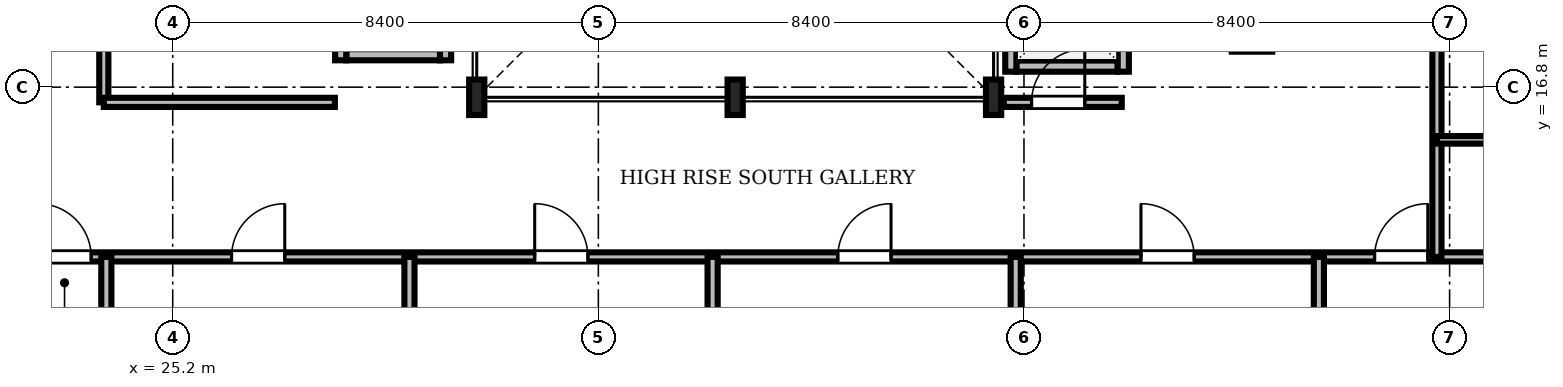
"""IFC4 building model, lengths in metres.
Left out: names, types, materials, properties, quantities, classifications, styles, units other than length and angle.
Written with IfcOpenShell. Run it as: python <this file> out.ifc"""

import sys

from ifc_helpers import new_model, si_unit, direction, frame, frame_2d, origin, origin_2d, place, context, subcontext, project, spatial, rectangle, i_section, extrude, source, transform, mapped, element, fill, save


model = new_model("IFC4")
c1 = context("Model", 3, precision=1e-05, world=origin(), true_north=direction((0.0, 1.0)))
c2 = subcontext(c1, "Body", "Model", "MODEL_VIEW")
j1 = project(units=[si_unit("LENGTHUNIT", "METRE"), si_unit("PLANEANGLEUNIT", "RADIAN")], contexts=[c1])
p1 = place(None, origin())
s1 = spatial("IfcSite", under=j1, at=p1, CompositionType="ELEMENT")
p2 = place(p1, origin())
s2 = spatial("IfcBuilding", under=s1, at=p2, CompositionType="ELEMENT")
p3 = place(p2, frame((0.0, 0.0, 207.3)))
s3 = spatial("IfcBuildingStorey", under=s2, at=p3, CompositionType="ELEMENT", Elevation=207.3)
m1 = source(origin(), c2, "Body", "SweptSolid", [
    extrude(i_section(OverallWidth=0.3, OverallDepth=0.7, WebThickness=0.017, FlangeThickness=0.032, FilletRadius=0.027, at=origin_2d()), origin(), (0.0, 0.0, 1.0), 3.53),
])
for number, where, z_axis, x_axis in (
    (1, (31.2, 16.6, 0.0), (0.0, 0.0, 1.0), (1.0, 0.0, 0.0)),
    (2, (36.3, 16.6, 0.0), (0.0, 0.0, 1.0), (1.0, 0.0, 0.0)),
    (3, (41.4, 16.6, 0.0), (0.0, 0.0, 1.0), (1.0, 0.0, 0.0)),
):
    element("IfcColumn", number, at=place(p3, frame(where, z_axis=z_axis, x_axis=x_axis)), inside=s3, PredefinedType="COLUMN", context=c2, shape_type="MappedRepresentation", body=[
        mapped(m1, transform((0.0, 0.0, 0.0), scale=1.0)),
    ])
m2 = source(origin(), c2, "Body", "SweptSolid", [
    extrude(rectangle(XDim=2.0, YDim=0.22, at=frame_2d((1.0, 0.0))), origin(), (0.0, 0.0, 1.0), 3.53),
])
p4 = place(p3, frame((41.85, 17.215, 0.0), z_axis=(0.0, 0.0, 1.0), x_axis=(1.0, 0.0, 0.0)))
e4 = element("IfcWall", 4, at=p4, inside=s3, PredefinedType="SOLIDWALL", context=c2, shape_type="MappedRepresentation", body=[
    mapped(m2, transform((0.0, 0.0, 0.0), scale=1.0)),
])
m3 = source(origin(), c2, "Body", "SweptSolid", [
    extrude(rectangle(XDim=2.19, YDim=0.22, at=frame_2d((1.095, 0.0))), origin(), (0.0, 0.0, 1.0), 3.53),
])
p5 = place(p3, frame((41.74, 17.105, 0.0), z_axis=(0.0, 0.0, 1.0), x_axis=(0.0, 1.0, 0.0)))
e5 = element("IfcWall", 5, at=p5, inside=s3, PredefinedType="SOLIDWALL", context=c2, shape_type="MappedRepresentation", body=[
    mapped(m3, transform((0.0, 0.0, 0.0), scale=1.0)),
])
p6 = place(p3, frame((43.96, 17.105, 0.0), z_axis=(0.0, 0.0, 1.0), x_axis=(0.0, 1.0, 0.0)))
e6 = element("IfcWall", 6, at=p6, inside=s3, PredefinedType="SOLIDWALL", context=c2, shape_type="MappedRepresentation", body=[
    mapped(m3, transform((0.0, 0.0, 0.0), scale=1.0)),
])
m4 = source(origin(), c2, "Body", "SweptSolid", [
    extrude(rectangle(XDim=1.1, YDim=2.2, at=frame_2d((0.55, 1.1))), frame((0.0, 0.12, 0.0), z_axis=(0.0, -1.0, 0.0), x_axis=(1.0, 0.0, 0.0)), (0.0, 0.0, 1.0), 0.24),
])
p7 = place(p6, frame((0.545, 0.0, 0.0)))
e7 = element("IfcOpeningElement", 7, at=p7, cuts=e6, PredefinedType="OPENING", context=c2, shape_type="MappedRepresentation", body=[
    mapped(m4, transform((0.0, 0.0, 0.0), scale=1.0)),
])
m5 = source(origin(), c2, "Body", "SweptSolid", [
    extrude(rectangle(XDim=1.85, YDim=0.22, at=frame_2d((0.925, 0.0))), origin(), (0.0, 0.0, 1.0), 2.972),
])
p8 = place(p3, frame((28.625, 17.44, 0.0), z_axis=(0.0, 0.0, 1.0), x_axis=(1.0, 0.0, 0.0)))
e8 = element("IfcWall", 8, at=p8, inside=s3, PredefinedType="SOLIDWALL", context=c2, shape_type="MappedRepresentation", body=[
    mapped(m5, transform((0.0, 0.0, 0.0), scale=1.0)),
])
m6 = source(origin(), c2, "Body", "SweptSolid", [
    extrude(rectangle(XDim=2.54, YDim=0.22, at=frame_2d((1.27, 0.0))), origin(), (0.0, 0.0, 1.0), 2.972),
])
p9 = place(p3, frame((28.515, 17.33, 0.0), z_axis=(0.0, 0.0, 1.0), x_axis=(0.0, 1.0, 0.0)))
e9 = element("IfcWall", 9, at=p9, inside=s3, PredefinedType="SOLIDWALL", context=c2, shape_type="MappedRepresentation", body=[
    mapped(m6, transform((0.0, 0.0, 0.0), scale=1.0)),
])
m7 = source(origin(), c2, "Body", "SweptSolid", [
    extrude(rectangle(XDim=2.54, YDim=0.22, at=frame_2d((1.27, 0.0))), origin(), (0.0, 0.0, 1.0), 3.53),
])
p10 = place(p3, frame((30.585, 17.33, 0.0), z_axis=(0.0, 0.0, 1.0), x_axis=(0.0, 1.0, 0.0)))
e10 = element("IfcWall", 10, at=p10, inside=s3, PredefinedType="SOLIDWALL", context=c2, shape_type="MappedRepresentation", body=[
    mapped(m7, transform((0.0, 0.0, 0.0), scale=1.0)),
])
m8 = source(origin(), c2, "Body", "SweptSolid", [
    extrude(rectangle(XDim=46.156, YDim=0.18, at=frame_2d((23.078, 0.0))), origin(), (0.0, 0.0, 1.0), 2.772),
])
p11 = place(p3, frame((11.422, 13.45, 0.0), z_axis=(0.0, 0.0, 1.0), x_axis=(1.0, 0.0, 0.0)))
e11 = element("IfcWall", 11, at=p11, inside=s3, PredefinedType="PARTITIONING", context=c2, shape_type="MappedRepresentation", body=[
    mapped(m8, transform((0.0, 0.0, 0.0), scale=1.0)),
])
m9 = source(origin(), c2, "Body", "SweptSolid", [
    extrude(rectangle(XDim=1.05, YDim=2.2, at=frame_2d((0.525, 1.1))), frame((0.0, 0.1, 0.0), z_axis=(0.0, -1.0, 0.0), x_axis=(1.0, 0.0, 0.0)), (0.0, 0.0, 1.0), 0.2),
])
p12 = place(p11, frame((11.118, 0.0, 0.0)))
e12 = element("IfcOpeningElement", 12, at=p12, cuts=e11, PredefinedType="OPENING", context=c2, shape_type="MappedRepresentation", body=[
    mapped(m9, transform((0.0, 0.0, 0.0), scale=1.0)),
])
p13 = place(p11, frame((14.939, 0.0, 0.0)))
e13 = element("IfcOpeningElement", 13, at=p13, cuts=e11, PredefinedType="OPENING", context=c2, shape_type="MappedRepresentation", body=[
    mapped(m9, transform((0.0, 0.0, 0.0), scale=1.0)),
])
p14 = place(p11, frame((20.922, 0.0, 0.0)))
e14 = element("IfcOpeningElement", 14, at=p14, cuts=e11, PredefinedType="OPENING", context=c2, shape_type="MappedRepresentation", body=[
    mapped(m9, transform((0.0, 0.0, 0.0), scale=1.0)),
])
p15 = place(p11, frame((26.904, 0.0, 0.0)))
e15 = element("IfcOpeningElement", 15, at=p15, cuts=e11, PredefinedType="OPENING", context=c2, shape_type="MappedRepresentation", body=[
    mapped(m9, transform((0.0, 0.0, 0.0), scale=1.0)),
])
p16 = place(p11, frame((32.887, 0.0, 0.0)))
e16 = element("IfcOpeningElement", 16, at=p16, cuts=e11, PredefinedType="OPENING", context=c2, shape_type="MappedRepresentation", body=[
    mapped(m9, transform((0.0, 0.0, 0.0), scale=1.0)),
])
p17 = place(p11, frame((37.498, 0.0, 0.0)))
e17 = element("IfcOpeningElement", 17, at=p17, cuts=e11, PredefinedType="OPENING", context=c2, shape_type="MappedRepresentation", body=[
    mapped(m9, transform((0.0, 0.0, 0.0), scale=1.0)),
])
m10 = source(origin(), c2, "Body", "SweptSolid", [
    extrude(rectangle(XDim=27.65, YDim=0.18, at=frame_2d((13.825, 0.0))), origin(), (0.0, 0.0, 1.0), 2.972),
])
p18 = place(p3, frame((50.15, 13.45, 0.0), z_axis=(0.0, 0.0, 1.0), x_axis=(0.0, 1.0, 0.0)))
e18 = element("IfcWall", 18, at=p18, inside=s3, PredefinedType="PARTITIONING", context=c2, shape_type="MappedRepresentation", body=[
    mapped(m10, transform((0.0, 0.0, 0.0), scale=1.0)),
])
p19 = place(p18, frame((5.237, 0.0, 0.0)))
e19 = element("IfcOpeningElement", 19, at=p19, cuts=e18, PredefinedType="OPENING", context=c2, shape_type="MappedRepresentation", body=[
    mapped(m9, transform((0.0, 0.0, 0.0), scale=1.0)),
])
p20 = place(p18, frame((14.38, 0.0, 0.0)))
e20 = element("IfcOpeningElement", 20, at=p20, cuts=e18, PredefinedType="OPENING", context=c2, shape_type="MappedRepresentation", body=[
    mapped(m9, transform((0.0, 0.0, 0.0), scale=1.0)),
])
p21 = place(p18, frame((23.523, 0.0, 0.0)))
e21 = element("IfcOpeningElement", 21, at=p21, cuts=e18, PredefinedType="OPENING", context=c2, shape_type="MappedRepresentation", body=[
    mapped(m9, transform((0.0, 0.0, 0.0), scale=1.0)),
])
m11 = source(origin(), c2, "Body", "SweptSolid", [
    extrude(rectangle(XDim=3.55, YDim=0.18, at=frame_2d((1.775, 0.0))), origin(), (0.0, 0.0, 1.0), 2.972),
])
p22 = place(p3, frame((23.84, 16.5, 0.0), z_axis=(0.0, 0.0, 1.0), x_axis=(0.0, 1.0, 0.0)))
e22 = element("IfcWall", 22, at=p22, inside=s3, PredefinedType="PARTITIONING", context=c2, shape_type="MappedRepresentation", body=[
    mapped(m11, transform((0.0, 0.0, 0.0), scale=1.0)),
])
p23 = place(p22, frame((1.15, 0.0, 0.0)))
e23 = element("IfcOpeningElement", 23, at=p23, cuts=e22, PredefinedType="OPENING", context=c2, shape_type="MappedRepresentation", body=[
    mapped(m9, transform((0.0, 0.0, 0.0), scale=1.0)),
])
m12 = source(origin(), c2, "Body", "SweptSolid", [
    extrude(rectangle(XDim=2.33, YDim=0.18, at=frame_2d((1.165, 0.0))), origin(), (0.0, 0.0, 1.0), 2.972),
])
p24 = place(p3, frame((41.6, 16.5, 0.0), z_axis=(0.0, 0.0, 1.0), x_axis=(1.0, 0.0, 0.0)))
e24 = element("IfcWall", 24, at=p24, inside=s3, PredefinedType="PARTITIONING", context=c2, shape_type="MappedRepresentation", body=[
    mapped(m12, transform((0.0, 0.0, 0.0), scale=1.0)),
])
p25 = place(p24, frame((0.55, 0.0, 0.0)))
e25 = element("IfcOpeningElement", 25, at=p25, cuts=e24, PredefinedType="OPENING", context=c2, shape_type="MappedRepresentation", body=[
    mapped(m9, transform((0.0, 0.0, 0.0), scale=1.0)),
])
m13 = source(origin(), c2, "Body", "SweptSolid", [
    extrude(rectangle(XDim=11.328, YDim=0.2, at=frame_2d((5.664, 0.0))), origin(), (0.0, 0.0, 1.0), 2.772),
])
for number, where, z_axis, x_axis in (
    (26, (23.89, 2.122, 0.0), (0.0, 0.0, 1.0), (0.0, 1.0, 0.0)),
    (27, (29.872, 2.122, 0.0), (0.0, 0.0, 1.0), (0.0, 1.0, 0.0)),
):
    element("IfcWall", number, at=place(p3, frame(where, z_axis=z_axis, x_axis=x_axis)), inside=s3, PredefinedType="PARTITIONING", context=c2, shape_type="MappedRepresentation", body=[
        mapped(m13, transform((0.0, 0.0, 0.0), scale=1.0)),
    ])
m14 = source(origin(), c2, "Body", "SweptSolid", [
    extrude(rectangle(XDim=11.52, YDim=0.2, at=frame_2d((5.76, 0.0))), origin(), (0.0, 0.0, 1.0), 2.772),
])
p26 = place(p3, frame((35.855, 1.93, 0.0), z_axis=(0.0, 0.0, 1.0), x_axis=(0.0, 1.0, 0.0)))
e28 = element("IfcWall", 28, at=p26, inside=s3, PredefinedType="PARTITIONING", context=c2, shape_type="MappedRepresentation", body=[
    mapped(m14, transform((0.0, 0.0, 0.0), scale=1.0)),
])
for number, where, z_axis, x_axis in (
    (29, (41.837, 2.122, 0.0), (0.0, 0.0, 1.0), (0.0, 1.0, 0.0)),
    (30, (47.82, 2.122, 0.0), (0.0, 0.0, 1.0), (0.0, 1.0, 0.0)),
):
    element("IfcWall", number, at=place(p3, frame(where, z_axis=z_axis, x_axis=x_axis)), inside=s3, PredefinedType="PARTITIONING", context=c2, shape_type="MappedRepresentation", body=[
        mapped(m13, transform((0.0, 0.0, 0.0), scale=1.0)),
    ])
m15 = source(origin(), c2, "Body", "SweptSolid", [
    extrude(rectangle(XDim=4.56, YDim=0.18, at=frame_2d((2.28, 0.0))), origin(), (0.0, 0.0, 1.0), 3.53),
])
p27 = place(p3, frame((23.84, 16.5, 0.0), z_axis=(0.0, 0.0, 1.0), x_axis=(1.0, 0.0, 0.0)))
e31 = element("IfcWall", 31, at=p27, inside=s3, PredefinedType="PARTITIONING", context=c2, shape_type="MappedRepresentation", body=[
    mapped(m15, transform((0.0, 0.0, 0.0), scale=1.0)),
])
m16 = source(origin(), c2, "Body", "SweptSolid", [
    extrude(rectangle(XDim=2.36, YDim=0.15, at=frame_2d((1.18, 0.0))), origin(), (0.0, 0.0, 1.0), 3.53),
])
p28 = place(p3, frame((50.15, 15.76, 0.0), z_axis=(0.0, 0.0, 1.0), x_axis=(1.0, 0.0, 0.0)))
e32 = element("IfcWall", 32, at=p28, inside=s3, PredefinedType="PARTITIONING", context=c2, shape_type="MappedRepresentation", body=[
    mapped(m16, transform((0.0, 0.0, 0.0), scale=1.0)),
])
m17 = source(origin(), c2, "Body", "SweptSolid", [
    extrude(rectangle(XDim=1.05, YDim=2.2, at=frame_2d((0.525, 1.1))), frame((0.0, 0.025, 0.0), z_axis=(0.0, -1.0, 0.0), x_axis=(1.0, 0.0, 0.0)), (0.0, 0.0, 1.0), 0.05),
])
p29 = place(p12, origin())
e33 = element("IfcDoor", 33, at=p29, inside=s3, OperationType="SINGLE_SWING_LEFT", PredefinedType="DOOR", context=c2, shape_type="MappedRepresentation", body=[
    mapped(m17, transform((0.0, 0.0, 0.0), scale=1.0)),
])
fill(e12, e33)
p30 = place(p13, origin())
e34 = element("IfcDoor", 34, at=p30, inside=s3, OperationType="SINGLE_SWING_RIGHT", PredefinedType="DOOR", context=c2, shape_type="MappedRepresentation", body=[
    mapped(m17, transform((0.0, 0.0, 0.0), scale=1.0)),
])
fill(e13, e34)
p31 = place(p14, origin())
e35 = element("IfcDoor", 35, at=p31, inside=s3, OperationType="SINGLE_SWING_LEFT", PredefinedType="DOOR", context=c2, shape_type="MappedRepresentation", body=[
    mapped(m17, transform((0.0, 0.0, 0.0), scale=1.0)),
])
fill(e14, e35)
p32 = place(p15, origin())
e36 = element("IfcDoor", 36, at=p32, inside=s3, OperationType="SINGLE_SWING_RIGHT", PredefinedType="DOOR", context=c2, shape_type="MappedRepresentation", body=[
    mapped(m17, transform((0.0, 0.0, 0.0), scale=1.0)),
])
fill(e15, e36)
p33 = place(p16, origin())
e37 = element("IfcDoor", 37, at=p33, inside=s3, OperationType="SINGLE_SWING_LEFT", PredefinedType="DOOR", context=c2, shape_type="MappedRepresentation", body=[
    mapped(m17, transform((0.0, 0.0, 0.0), scale=1.0)),
])
fill(e16, e37)
p34 = place(p17, origin())
e38 = element("IfcDoor", 38, at=p34, inside=s3, OperationType="SINGLE_SWING_RIGHT", PredefinedType="DOOR", context=c2, shape_type="MappedRepresentation", body=[
    mapped(m17, transform((0.0, 0.0, 0.0), scale=1.0)),
])
fill(e17, e38)
p35 = place(p25, origin())
e39 = element("IfcDoor", 39, at=p35, inside=s3, OperationType="SINGLE_SWING_RIGHT", PredefinedType="DOOR", context=c2, shape_type="MappedRepresentation", body=[
    mapped(m17, transform((0.0, 0.0, 0.0), scale=1.0)),
])
fill(e25, e39)
save(model, sys.argv[1])
